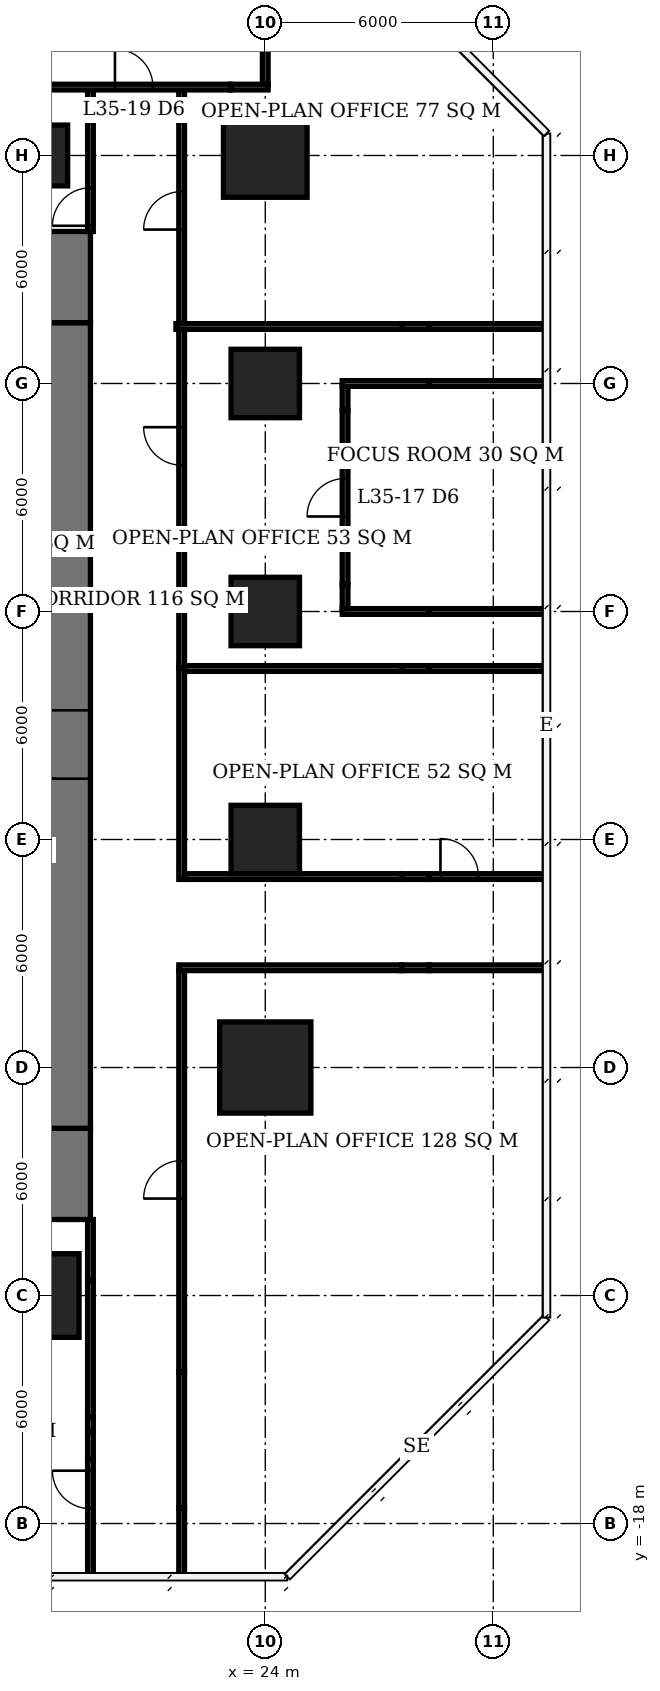
"""IFC4 building model, lengths in metres.
Left out: names, types, materials, properties, quantities, classifications, styles, units other than length and angle.
Written with IfcOpenShell. Run it as: python <this file> out.ifc"""

import sys

from ifc_helpers import new_model, si_unit, direction, frame, frame_2d, origin, origin_2d, place, context, subcontext, project, spatial, rectangle, extrude, element, fill, save


model = new_model("IFC4")
c1 = context("Model", 3, precision=1e-05, world=origin(), true_north=direction((0.0, 1.0)))
c2 = subcontext(c1, "Body", "Model", "MODEL_VIEW")
j1 = project(units=[si_unit("LENGTHUNIT", "METRE"), si_unit("PLANEANGLEUNIT", "RADIAN")], contexts=[c1])
p1 = place(None, origin())
s1 = spatial("IfcSite", under=j1, at=p1, CompositionType="ELEMENT")
p2 = place(p1, origin())
s2 = spatial("IfcBuilding", under=s1, at=p2, CompositionType="ELEMENT")
p3 = place(p2, frame((0.0, 0.0, 144.5)))
s3 = spatial("IfcBuildingStorey", under=s2, at=p3, CompositionType="ELEMENT", Elevation=144.5)
p4 = place(p3, frame((18.0, -12.0, 0.0), z_axis=(0.0, 0.0, 1.0), x_axis=(1.0, 0.0, 0.0)))
e1 = element("IfcColumn", 1, at=p4, inside=s3, PredefinedType="COLUMN", context=c2, shape_type="SweptSolid", body=[
    extrude(rectangle(XDim=2.2, YDim=2.2, at=origin_2d()), origin(), (0.0, 0.0, 1.0), 3.9),
])
p5 = place(p3, frame((18.0, 18.0, 0.0), z_axis=(0.0, 0.0, 1.0), x_axis=(1.0, 0.0, 0.0)))
e2 = element("IfcColumn", 2, at=p5, inside=s3, PredefinedType="COLUMN", context=c2, shape_type="SweptSolid", body=[
    extrude(rectangle(XDim=1.6, YDim=1.6, at=origin_2d()), origin(), (0.0, 0.0, 1.0), 3.9),
])
p6 = place(p3, frame((24.0, -6.0, 0.0), z_axis=(0.0, 0.0, 1.0), x_axis=(1.0, 0.0, 0.0)))
e3 = element("IfcColumn", 3, at=p6, inside=s3, PredefinedType="COLUMN", context=c2, shape_type="SweptSolid", body=[
    extrude(rectangle(XDim=2.4, YDim=2.4, at=origin_2d()), origin(), (0.0, 0.0, 1.0), 3.9),
])
for number, where, z_axis, x_axis in (
    (4, (24.0, 0.0, 0.0), (0.0, 0.0, 1.0), (1.0, 0.0, 0.0)),
    (5, (24.0, 6.0, 0.0), (0.0, 0.0, 1.0), (1.0, 0.0, 0.0)),
    (6, (24.0, 12.0, 0.0), (0.0, 0.0, 1.0), (1.0, 0.0, 0.0)),
):
    element("IfcColumn", number, at=place(p3, frame(where, z_axis=z_axis, x_axis=x_axis)), inside=s3, PredefinedType="COLUMN", context=c2, shape_type="SweptSolid", body=[
        extrude(rectangle(XDim=1.8, YDim=1.8, at=origin_2d()), origin(), (0.0, 0.0, 1.0), 3.9),
    ])
p7 = place(p3, frame((24.0, 18.0, 0.0), z_axis=(0.0, 0.0, 1.0), x_axis=(1.0, 0.0, 0.0)))
e7 = element("IfcColumn", 7, at=p7, inside=s3, PredefinedType="COLUMN", context=c2, shape_type="SweptSolid", body=[
    extrude(rectangle(XDim=2.2, YDim=2.2, at=origin_2d()), origin(), (0.0, 0.0, 1.0), 3.9),
])
p8 = place(p3, frame((18.5, -7.6, 0.0), z_axis=(0.0, 0.0, 1.0), x_axis=(0.0, 1.0, 0.0)))
e8 = element("IfcWall", 8, at=p8, inside=s3, PredefinedType="SHEAR", context=c2, shape_type="SweptSolid", body=[
    extrude(rectangle(XDim=21.2, YDim=1.8, at=frame_2d((10.6, 0.0))), origin(), (0.0, 0.0, 1.0), 3.9),
])
p9 = place(p8, frame((9.2, 0.0, 0.0)))
e9 = element("IfcOpeningElement", 9, at=p9, cuts=e8, PredefinedType="OPENING", context=c2, shape_type="SweptSolid", body=[
    extrude(rectangle(XDim=1.8, YDim=2.4, at=frame_2d((0.9, 1.2))), frame((0.0, 0.91, 0.0), z_axis=(0.0, -1.0, 0.0), x_axis=(1.0, 0.0, 0.0)), (0.0, 0.0, 1.0), 1.82),
])
for number, where, z_axis, x_axis in (
    (10, (18.5, -10.0, 0.0), (0.0, 0.0, 1.0), (0.0, 1.0, 0.0)),
    (11, (18.5, 13.6, 0.0), (0.0, 0.0, 1.0), (0.0, 1.0, 0.0)),
):
    element("IfcWall", number, at=place(p3, frame(where, z_axis=z_axis, x_axis=x_axis)), inside=s3, PredefinedType="SHEAR", context=c2, shape_type="SweptSolid", body=[
        extrude(rectangle(XDim=2.4, YDim=1.8, at=frame_2d((1.2, 0.0))), origin(), (0.0, 0.0, 1.0), 3.9),
    ])
p10 = place(p3, frame((26.025, 6.0, 0.0), z_axis=(0.0, 0.0, 1.0), x_axis=(1.0, 0.0, 0.0)))
e12 = element("IfcWall", 12, at=p10, inside=s3, PredefinedType="PARTITIONING", context=c2, shape_type="SweptSolid", body=[
    extrude(rectangle(XDim=2.285, YDim=0.15, at=frame_2d((1.143, 0.0))), origin(), (0.0, 0.0, 1.0), 2.65),
])
p11 = place(p3, frame((28.31, 6.0, 0.0), z_axis=(0.0, 0.0, 1.0), x_axis=(1.0, 0.0, 0.0)))
e13 = element("IfcWall", 13, at=p11, inside=s3, PredefinedType="PARTITIONING", context=c2, shape_type="SweptSolid", body=[
    extrude(rectangle(XDim=3.04, YDim=0.15, at=frame_2d((1.52, 0.0))), origin(), (0.0, 0.0, 1.0), 3.65),
])
p12 = place(p3, frame((26.025, 12.0, 0.0), z_axis=(0.0, 0.0, 1.0), x_axis=(1.0, 0.0, 0.0)))
e14 = element("IfcWall", 14, at=p12, inside=s3, PredefinedType="PARTITIONING", context=c2, shape_type="SweptSolid", body=[
    extrude(rectangle(XDim=2.285, YDim=0.15, at=frame_2d((1.143, 0.0))), origin(), (0.0, 0.0, 1.0), 2.65),
])
p13 = place(p3, frame((28.31, 12.0, 0.0), z_axis=(0.0, 0.0, 1.0), x_axis=(1.0, 0.0, 0.0)))
e15 = element("IfcWall", 15, at=p13, inside=s3, PredefinedType="PARTITIONING", context=c2, shape_type="SweptSolid", body=[
    extrude(rectangle(XDim=3.09, YDim=0.15, at=frame_2d((1.545, 0.0))), origin(), (0.0, 0.0, 1.0), 3.65),
])
p14 = place(p3, frame((18.075, 19.8, 0.0), z_axis=(0.0, 0.0, 1.0), x_axis=(1.0, 0.0, 0.0)))
e16 = element("IfcWall", 16, at=p14, inside=s3, PredefinedType="PARTITIONING", context=c2, shape_type="SweptSolid", body=[
    extrude(rectangle(XDim=5.015, YDim=0.15, at=frame_2d((2.508, 0.0))), origin(), (0.0, 0.0, 1.0), 3.65),
])
p15 = place(p14, frame((1.97, 0.0, 0.0)))
e17 = element("IfcOpeningElement", 17, at=p15, cuts=e16, PredefinedType="OPENING", context=c2, shape_type="SweptSolid", body=[
    extrude(rectangle(XDim=1.0, YDim=2.1, at=frame_2d((0.5, 1.05))), frame((0.0, 0.085, 0.0), z_axis=(0.0, -1.0, 0.0), x_axis=(1.0, 0.0, 0.0)), (0.0, 0.0, 1.0), 0.17),
])
p16 = place(p3, frame((23.09, 19.8, 0.0), z_axis=(0.0, 0.0, 1.0), x_axis=(1.0, 0.0, 0.0)))
e18 = element("IfcWall", 18, at=p16, inside=s3, PredefinedType="PARTITIONING", context=c2, shape_type="SweptSolid", body=[
    extrude(rectangle(XDim=0.985, YDim=0.15, at=frame_2d((0.492, 0.0))), origin(), (0.0, 0.0, 1.0), 2.65),
])
p17 = place(p3, frame((24.0, 19.875, 0.0), z_axis=(0.0, 0.0, 1.0), x_axis=(0.0, 1.0, 0.0)))
e19 = element("IfcWall", 19, at=p17, inside=s3, PredefinedType="PARTITIONING", context=c2, shape_type="SweptSolid", body=[
    extrude(rectangle(XDim=2.17, YDim=0.15, at=frame_2d((1.085, 0.0))), origin(), (0.0, 0.0, 1.0), 2.65),
])
p18 = place(p3, frame((26.1, 6.075, 0.0), z_axis=(0.0, 0.0, 1.0), x_axis=(0.0, 1.0, 0.0)))
e20 = element("IfcWall", 20, at=p18, inside=s3, PredefinedType="PARTITIONING", context=c2, shape_type="SweptSolid", body=[
    extrude(rectangle(XDim=0.635, YDim=0.15, at=frame_2d((0.317, 0.0))), origin(), (0.0, 0.0, 1.0), 2.65),
])
p19 = place(p3, frame((26.1, 6.71, 0.0), z_axis=(0.0, 0.0, 1.0), x_axis=(0.0, 1.0, 0.0)))
e21 = element("IfcWall", 21, at=p19, inside=s3, PredefinedType="PARTITIONING", context=c2, shape_type="SweptSolid", body=[
    extrude(rectangle(XDim=4.58, YDim=0.15, at=frame_2d((2.29, 0.0))), origin(), (0.0, 0.0, 1.0), 3.65),
])
p20 = place(p19, frame((1.79, 0.0, 0.0)))
e22 = element("IfcOpeningElement", 22, at=p20, cuts=e21, PredefinedType="OPENING", context=c2, shape_type="SweptSolid", body=[
    extrude(rectangle(XDim=1.0, YDim=2.1, at=frame_2d((0.5, 1.05))), frame((0.0, 0.085, 0.0), z_axis=(0.0, -1.0, 0.0), x_axis=(1.0, 0.0, 0.0)), (0.0, 0.0, 1.0), 0.17),
])
p21 = place(p3, frame((26.1, 11.29, 0.0), z_axis=(0.0, 0.0, 1.0), x_axis=(0.0, 1.0, 0.0)))
e23 = element("IfcWall", 23, at=p21, inside=s3, PredefinedType="PARTITIONING", context=c2, shape_type="SweptSolid", body=[
    extrude(rectangle(XDim=0.635, YDim=0.15, at=frame_2d((0.317, 0.0))), origin(), (0.0, 0.0, 1.0), 2.65),
])
p22 = place(p3, frame((19.4, -19.4, 0.0), z_axis=(0.0, 0.0, 1.0), x_axis=(0.0, 1.0, 0.0)))
e24 = element("IfcWall", 24, at=p22, inside=s3, PredefinedType="PARTITIONING", context=c2, shape_type="SweptSolid", body=[
    extrude(rectangle(XDim=3.09, YDim=0.15, at=frame_2d((1.545, 0.0))), origin(), (0.0, 0.0, 1.0), 3.65),
])
p23 = place(p22, frame((1.79, 0.0, 0.0)))
e25 = element("IfcOpeningElement", 25, at=p23, cuts=e24, PredefinedType="OPENING", context=c2, shape_type="SweptSolid", body=[
    extrude(rectangle(XDim=1.0, YDim=2.1, at=frame_2d((0.5, 1.05))), frame((0.0, 0.085, 0.0), z_axis=(0.0, -1.0, 0.0), x_axis=(1.0, 0.0, 0.0)), (0.0, 0.0, 1.0), 0.17),
])
p24 = place(p3, frame((19.4, -16.31, 0.0), z_axis=(0.0, 0.0, 1.0), x_axis=(0.0, 1.0, 0.0)))
e26 = element("IfcWall", 26, at=p24, inside=s3, PredefinedType="PARTITIONING", context=c2, shape_type="SweptSolid", body=[
    extrude(rectangle(XDim=0.72, YDim=0.15, at=frame_2d((0.36, 0.0))), origin(), (0.0, 0.0, 1.0), 2.65),
])
p25 = place(p3, frame((19.4, -15.59, 0.0), z_axis=(0.0, 0.0, 1.0), x_axis=(0.0, 1.0, 0.0)))
e27 = element("IfcWall", 27, at=p25, inside=s3, PredefinedType="PARTITIONING", context=c2, shape_type="SweptSolid", body=[
    extrude(rectangle(XDim=0.398, YDim=0.15, at=frame_2d((0.199, 0.0))), origin(), (0.0, 0.0, 1.0), 3.65),
])
p26 = place(p3, frame((19.4, -15.192, 0.0), z_axis=(0.0, 0.0, 1.0), x_axis=(0.0, 1.0, 0.0)))
e28 = element("IfcWall", 28, at=p26, inside=s3, PredefinedType="PARTITIONING", context=c2, shape_type="SweptSolid", body=[
    extrude(rectangle(XDim=3.584, YDim=0.15, at=frame_2d((1.792, 0.0))), origin(), (0.0, 0.0, 1.0), 2.65),
])
p27 = place(p3, frame((19.4, -11.608, 0.0), z_axis=(0.0, 0.0, 1.0), x_axis=(0.0, 1.0, 0.0)))
e29 = element("IfcWall", 29, at=p27, inside=s3, PredefinedType="PARTITIONING", context=c2, shape_type="SweptSolid", body=[
    extrude(rectangle(XDim=1.608, YDim=0.15, at=frame_2d((0.804, 0.0))), origin(), (0.0, 0.0, 1.0), 3.65),
])
p28 = place(p3, frame((19.4, 16.0, 0.0), z_axis=(0.0, 0.0, 1.0), x_axis=(0.0, 1.0, 0.0)))
e30 = element("IfcWall", 30, at=p28, inside=s3, PredefinedType="PARTITIONING", context=c2, shape_type="SweptSolid", body=[
    extrude(rectangle(XDim=3.725, YDim=0.15, at=frame_2d((1.863, 0.0))), origin(), (0.0, 0.0, 1.0), 3.65),
])
p29 = place(p28, frame((0.15, 0.0, 0.0)))
e31 = element("IfcOpeningElement", 31, at=p29, cuts=e30, PredefinedType="OPENING", context=c2, shape_type="SweptSolid", body=[
    extrude(rectangle(XDim=1.0, YDim=2.1, at=frame_2d((0.5, 1.05))), frame((0.0, 0.085, 0.0), z_axis=(0.0, -1.0, 0.0), x_axis=(1.0, 0.0, 0.0)), (0.0, 0.0, 1.0), 0.17),
])
p30 = place(p3, frame((21.8, -19.4, 0.0), z_axis=(0.0, 0.0, 1.0), x_axis=(0.0, 1.0, 0.0)))
e32 = element("IfcWall", 32, at=p30, inside=s3, PredefinedType="PARTITIONING", context=c2, shape_type="SweptSolid", body=[
    extrude(rectangle(XDim=1.808, YDim=0.15, at=frame_2d((0.904, 0.0))), origin(), (0.0, 0.0, 1.0), 3.65),
])
p31 = place(p3, frame((21.8, -17.592, 0.0), z_axis=(0.0, 0.0, 1.0), x_axis=(0.0, 1.0, 0.0)))
e33 = element("IfcWall", 33, at=p31, inside=s3, PredefinedType="PARTITIONING", context=c2, shape_type="SweptSolid", body=[
    extrude(rectangle(XDim=3.584, YDim=0.15, at=frame_2d((1.792, 0.0))), origin(), (0.0, 0.0, 1.0), 2.65),
])
p32 = place(p3, frame((21.8, -14.008, 0.0), z_axis=(0.0, 0.0, 1.0), x_axis=(0.0, 1.0, 0.0)))
e34 = element("IfcWall", 34, at=p32, inside=s3, PredefinedType="PARTITIONING", context=c2, shape_type="SweptSolid", body=[
    extrude(rectangle(XDim=10.558, YDim=0.15, at=frame_2d((5.279, 0.0))), origin(), (0.0, 0.0, 1.0), 3.65),
])
p33 = place(p32, frame((4.559, 0.0, 0.0)))
e35 = element("IfcOpeningElement", 35, at=p33, cuts=e34, PredefinedType="OPENING", context=c2, shape_type="SweptSolid", body=[
    extrude(rectangle(XDim=1.0, YDim=2.1, at=frame_2d((0.5, 1.05))), frame((0.0, 0.085, 0.0), z_axis=(0.0, -1.0, 0.0), x_axis=(1.0, 0.0, 0.0)), (0.0, 0.0, 1.0), 0.17),
])
p34 = place(p3, frame((21.725, -3.375, 0.0), z_axis=(0.0, 0.0, 1.0), x_axis=(1.0, 0.0, 0.0)))
e36 = element("IfcWall", 36, at=p34, inside=s3, PredefinedType="PARTITIONING", context=c2, shape_type="SweptSolid", body=[
    extrude(rectangle(XDim=5.865, YDim=0.15, at=frame_2d((2.933, 0.0))), origin(), (0.0, 0.0, 1.0), 3.65),
])
p35 = place(p3, frame((27.59, -3.375, 0.0), z_axis=(0.0, 0.0, 1.0), x_axis=(1.0, 0.0, 0.0)))
e37 = element("IfcWall", 37, at=p35, inside=s3, PredefinedType="PARTITIONING", context=c2, shape_type="SweptSolid", body=[
    extrude(rectangle(XDim=0.72, YDim=0.15, at=frame_2d((0.36, 0.0))), origin(), (0.0, 0.0, 1.0), 2.65),
])
p36 = place(p3, frame((28.31, -3.375, 0.0), z_axis=(0.0, 0.0, 1.0), x_axis=(1.0, 0.0, 0.0)))
e38 = element("IfcWall", 38, at=p36, inside=s3, PredefinedType="PARTITIONING", context=c2, shape_type="SweptSolid", body=[
    extrude(rectangle(XDim=3.04, YDim=0.15, at=frame_2d((1.52, 0.0))), origin(), (0.0, 0.0, 1.0), 3.65),
])
p37 = place(p3, frame((21.8, -1.05, 0.0), z_axis=(0.0, 0.0, 1.0), x_axis=(0.0, 1.0, 0.0)))
e39 = element("IfcWall", 39, at=p37, inside=s3, PredefinedType="PARTITIONING", context=c2, shape_type="SweptSolid", body=[
    extrude(rectangle(XDim=5.625, YDim=0.15, at=frame_2d((2.812, 0.0))), origin(), (0.0, 0.0, 1.0), 3.65),
])
p38 = place(p3, frame((21.875, -0.975, 0.0), z_axis=(0.0, 0.0, 1.0), x_axis=(1.0, 0.0, 0.0)))
e40 = element("IfcWall", 40, at=p38, inside=s3, PredefinedType="PARTITIONING", context=c2, shape_type="SweptSolid", body=[
    extrude(rectangle(XDim=5.715, YDim=0.15, at=frame_2d((2.857, 0.0))), origin(), (0.0, 0.0, 1.0), 3.65),
])
p39 = place(p3, frame((27.59, -0.975, 0.0), z_axis=(0.0, 0.0, 1.0), x_axis=(1.0, 0.0, 0.0)))
e41 = element("IfcWall", 41, at=p39, inside=s3, PredefinedType="PARTITIONING", context=c2, shape_type="SweptSolid", body=[
    extrude(rectangle(XDim=0.72, YDim=0.15, at=frame_2d((0.36, 0.0))), origin(), (0.0, 0.0, 1.0), 2.65),
])
p40 = place(p3, frame((28.31, -0.975, 0.0), z_axis=(0.0, 0.0, 1.0), x_axis=(1.0, 0.0, 0.0)))
e42 = element("IfcWall", 42, at=p40, inside=s3, PredefinedType="PARTITIONING", context=c2, shape_type="SweptSolid", body=[
    extrude(rectangle(XDim=3.09, YDim=0.15, at=frame_2d((1.545, 0.0))), origin(), (0.0, 0.0, 1.0), 3.65),
])
p41 = place(p40, frame((0.3, 0.0, 0.0)))
e43 = element("IfcOpeningElement", 43, at=p41, cuts=e42, PredefinedType="OPENING", context=c2, shape_type="SweptSolid", body=[
    extrude(rectangle(XDim=1.0, YDim=2.1, at=frame_2d((0.5, 1.05))), frame((0.0, 0.085, 0.0), z_axis=(0.0, -1.0, 0.0), x_axis=(1.0, 0.0, 0.0)), (0.0, 0.0, 1.0), 0.17),
])
p42 = place(p3, frame((21.8, 4.5, 0.0), z_axis=(0.0, 0.0, 1.0), x_axis=(0.0, 1.0, 0.0)))
e44 = element("IfcWall", 44, at=p42, inside=s3, PredefinedType="PARTITIONING", context=c2, shape_type="SweptSolid", body=[
    extrude(rectangle(XDim=8.925, YDim=0.15, at=frame_2d((4.462, 0.0))), origin(), (0.0, 0.0, 1.0), 3.65),
])
p43 = place(p42, frame((5.35, 0.0, 0.0)))
e45 = element("IfcOpeningElement", 45, at=p43, cuts=e44, PredefinedType="OPENING", context=c2, shape_type="SweptSolid", body=[
    extrude(rectangle(XDim=1.0, YDim=2.1, at=frame_2d((0.5, 1.05))), frame((0.0, 0.085, 0.0), z_axis=(0.0, -1.0, 0.0), x_axis=(1.0, 0.0, 0.0)), (0.0, 0.0, 1.0), 0.17),
])
p44 = place(p3, frame((21.875, 4.5, 0.0), z_axis=(0.0, 0.0, 1.0), x_axis=(1.0, 0.0, 0.0)))
e46 = element("IfcWall", 46, at=p44, inside=s3, PredefinedType="PARTITIONING", context=c2, shape_type="SweptSolid", body=[
    extrude(rectangle(XDim=5.715, YDim=0.15, at=frame_2d((2.857, 0.0))), origin(), (0.0, 0.0, 1.0), 3.65),
])
p45 = place(p3, frame((27.59, 4.5, 0.0), z_axis=(0.0, 0.0, 1.0), x_axis=(1.0, 0.0, 0.0)))
e47 = element("IfcWall", 47, at=p45, inside=s3, PredefinedType="PARTITIONING", context=c2, shape_type="SweptSolid", body=[
    extrude(rectangle(XDim=0.72, YDim=0.15, at=frame_2d((0.36, 0.0))), origin(), (0.0, 0.0, 1.0), 2.65),
])
p46 = place(p3, frame((28.31, 4.5, 0.0), z_axis=(0.0, 0.0, 1.0), x_axis=(1.0, 0.0, 0.0)))
e48 = element("IfcWall", 48, at=p46, inside=s3, PredefinedType="PARTITIONING", context=c2, shape_type="SweptSolid", body=[
    extrude(rectangle(XDim=3.09, YDim=0.15, at=frame_2d((1.545, 0.0))), origin(), (0.0, 0.0, 1.0), 3.65),
])
p47 = place(p3, frame((21.8, 13.575, 0.0), z_axis=(0.0, 0.0, 1.0), x_axis=(0.0, 1.0, 0.0)))
e49 = element("IfcWall", 49, at=p47, inside=s3, PredefinedType="PARTITIONING", context=c2, shape_type="SweptSolid", body=[
    extrude(rectangle(XDim=6.15, YDim=0.15, at=frame_2d((3.075, 0.0))), origin(), (0.0, 0.0, 1.0), 3.65),
])
p48 = place(p47, frame((2.475, 0.0, 0.0)))
e50 = element("IfcOpeningElement", 50, at=p48, cuts=e49, PredefinedType="OPENING", context=c2, shape_type="SweptSolid", body=[
    extrude(rectangle(XDim=1.0, YDim=2.1, at=frame_2d((0.5, 1.05))), frame((0.0, 0.085, 0.0), z_axis=(0.0, -1.0, 0.0), x_axis=(1.0, 0.0, 0.0)), (0.0, 0.0, 1.0), 0.17),
])
p49 = place(p3, frame((21.65, 13.5, 0.0), z_axis=(0.0, 0.0, 1.0), x_axis=(1.0, 0.0, 0.0)))
e51 = element("IfcWall", 51, at=p49, inside=s3, PredefinedType="PARTITIONING", context=c2, shape_type="SweptSolid", body=[
    extrude(rectangle(XDim=5.94, YDim=0.15, at=frame_2d((2.97, 0.0))), origin(), (0.0, 0.0, 1.0), 3.65),
])
p50 = place(p3, frame((27.59, 13.5, 0.0), z_axis=(0.0, 0.0, 1.0), x_axis=(1.0, 0.0, 0.0)))
e52 = element("IfcWall", 52, at=p50, inside=s3, PredefinedType="PARTITIONING", context=c2, shape_type="SweptSolid", body=[
    extrude(rectangle(XDim=0.72, YDim=0.15, at=frame_2d((0.36, 0.0))), origin(), (0.0, 0.0, 1.0), 2.65),
])
p51 = place(p3, frame((28.31, 13.5, 0.0), z_axis=(0.0, 0.0, 1.0), x_axis=(1.0, 0.0, 0.0)))
e53 = element("IfcWall", 53, at=p51, inside=s3, PredefinedType="PARTITIONING", context=c2, shape_type="SweptSolid", body=[
    extrude(rectangle(XDim=3.09, YDim=0.15, at=frame_2d((1.545, 0.0))), origin(), (0.0, 0.0, 1.0), 3.65),
])
p52 = place(p9, origin())
e54 = element("IfcDoor", 54, at=p52, inside=s3, OperationType="DOUBLE_DOOR_SINGLE_SWING", PredefinedType="DOOR", context=c2, shape_type="SweptSolid", body=[
    extrude(rectangle(XDim=1.8, YDim=2.4, at=frame_2d((0.9, 1.2))), frame((0.0, 0.025, 0.0), z_axis=(0.0, -1.0, 0.0), x_axis=(1.0, 0.0, 0.0)), (0.0, 0.0, 1.0), 0.05),
])
fill(e9, e54)
p53 = place(p20, origin())
e55 = element("IfcDoor", 55, at=p53, inside=s3, OperationType="SINGLE_SWING_LEFT", PredefinedType="DOOR", context=c2, shape_type="SweptSolid", body=[
    extrude(rectangle(XDim=1.0, YDim=2.1, at=frame_2d((0.5, 1.05))), frame((0.0, 0.025, 0.0), z_axis=(0.0, -1.0, 0.0), x_axis=(1.0, 0.0, 0.0)), (0.0, 0.0, 1.0), 0.05),
])
fill(e22, e55)
p54 = place(p15, origin())
e56 = element("IfcDoor", 56, at=p54, inside=s3, OperationType="SINGLE_SWING_LEFT", PredefinedType="DOOR", context=c2, shape_type="SweptSolid", body=[
    extrude(rectangle(XDim=1.0, YDim=2.1, at=frame_2d((0.5, 1.05))), frame((0.0, 0.025, 0.0), z_axis=(0.0, -1.0, 0.0), x_axis=(1.0, 0.0, 0.0)), (0.0, 0.0, 1.0), 0.05),
])
fill(e17, e56)
p55 = place(p23, origin())
e57 = element("IfcDoor", 57, at=p55, inside=s3, OperationType="SINGLE_SWING_RIGHT", PredefinedType="DOOR", context=c2, shape_type="SweptSolid", body=[
    extrude(rectangle(XDim=1.0, YDim=2.1, at=frame_2d((0.5, 1.05))), frame((0.0, 0.025, 0.0), z_axis=(0.0, -1.0, 0.0), x_axis=(1.0, 0.0, 0.0)), (0.0, 0.0, 1.0), 0.05),
])
fill(e25, e57)
p56 = place(p33, origin())
e58 = element("IfcDoor", 58, at=p56, inside=s3, OperationType="SINGLE_SWING_LEFT", PredefinedType="DOOR", context=c2, shape_type="SweptSolid", body=[
    extrude(rectangle(XDim=1.0, YDim=2.1, at=frame_2d((0.5, 1.05))), frame((0.0, 0.025, 0.0), z_axis=(0.0, -1.0, 0.0), x_axis=(1.0, 0.0, 0.0)), (0.0, 0.0, 1.0), 0.05),
])
fill(e35, e58)
p57 = place(p41, origin())
e59 = element("IfcDoor", 59, at=p57, inside=s3, OperationType="SINGLE_SWING_LEFT", PredefinedType="DOOR", context=c2, shape_type="SweptSolid", body=[
    extrude(rectangle(XDim=1.0, YDim=2.1, at=frame_2d((0.5, 1.05))), frame((0.0, 0.025, 0.0), z_axis=(0.0, -1.0, 0.0), x_axis=(1.0, 0.0, 0.0)), (0.0, 0.0, 1.0), 0.05),
])
fill(e43, e59)
p58 = place(p43, origin())
e60 = element("IfcDoor", 60, at=p58, inside=s3, OperationType="SINGLE_SWING_RIGHT", PredefinedType="DOOR", context=c2, shape_type="SweptSolid", body=[
    extrude(rectangle(XDim=1.0, YDim=2.1, at=frame_2d((0.5, 1.05))), frame((0.0, 0.025, 0.0), z_axis=(0.0, -1.0, 0.0), x_axis=(1.0, 0.0, 0.0)), (0.0, 0.0, 1.0), 0.05),
])
fill(e45, e60)
p59 = place(p48, origin())
e61 = element("IfcDoor", 61, at=p59, inside=s3, OperationType="SINGLE_SWING_LEFT", PredefinedType="DOOR", context=c2, shape_type="SweptSolid", body=[
    extrude(rectangle(XDim=1.0, YDim=2.1, at=frame_2d((0.5, 1.05))), frame((0.0, 0.025, 0.0), z_axis=(0.0, -1.0, 0.0), x_axis=(1.0, 0.0, 0.0)), (0.0, 0.0, 1.0), 0.05),
])
fill(e50, e61)
p60 = place(p29, origin())
e62 = element("IfcDoor", 62, at=p60, inside=s3, OperationType="SINGLE_SWING_LEFT", PredefinedType="DOOR", context=c2, shape_type="SweptSolid", body=[
    extrude(rectangle(XDim=1.0, YDim=2.1, at=frame_2d((0.5, 1.05))), frame((0.0, 0.025, 0.0), z_axis=(0.0, -1.0, 0.0), x_axis=(1.0, 0.0, 0.0)), (0.0, 0.0, 1.0), 0.05),
])
fill(e31, e62)
save(model, sys.argv[1])
